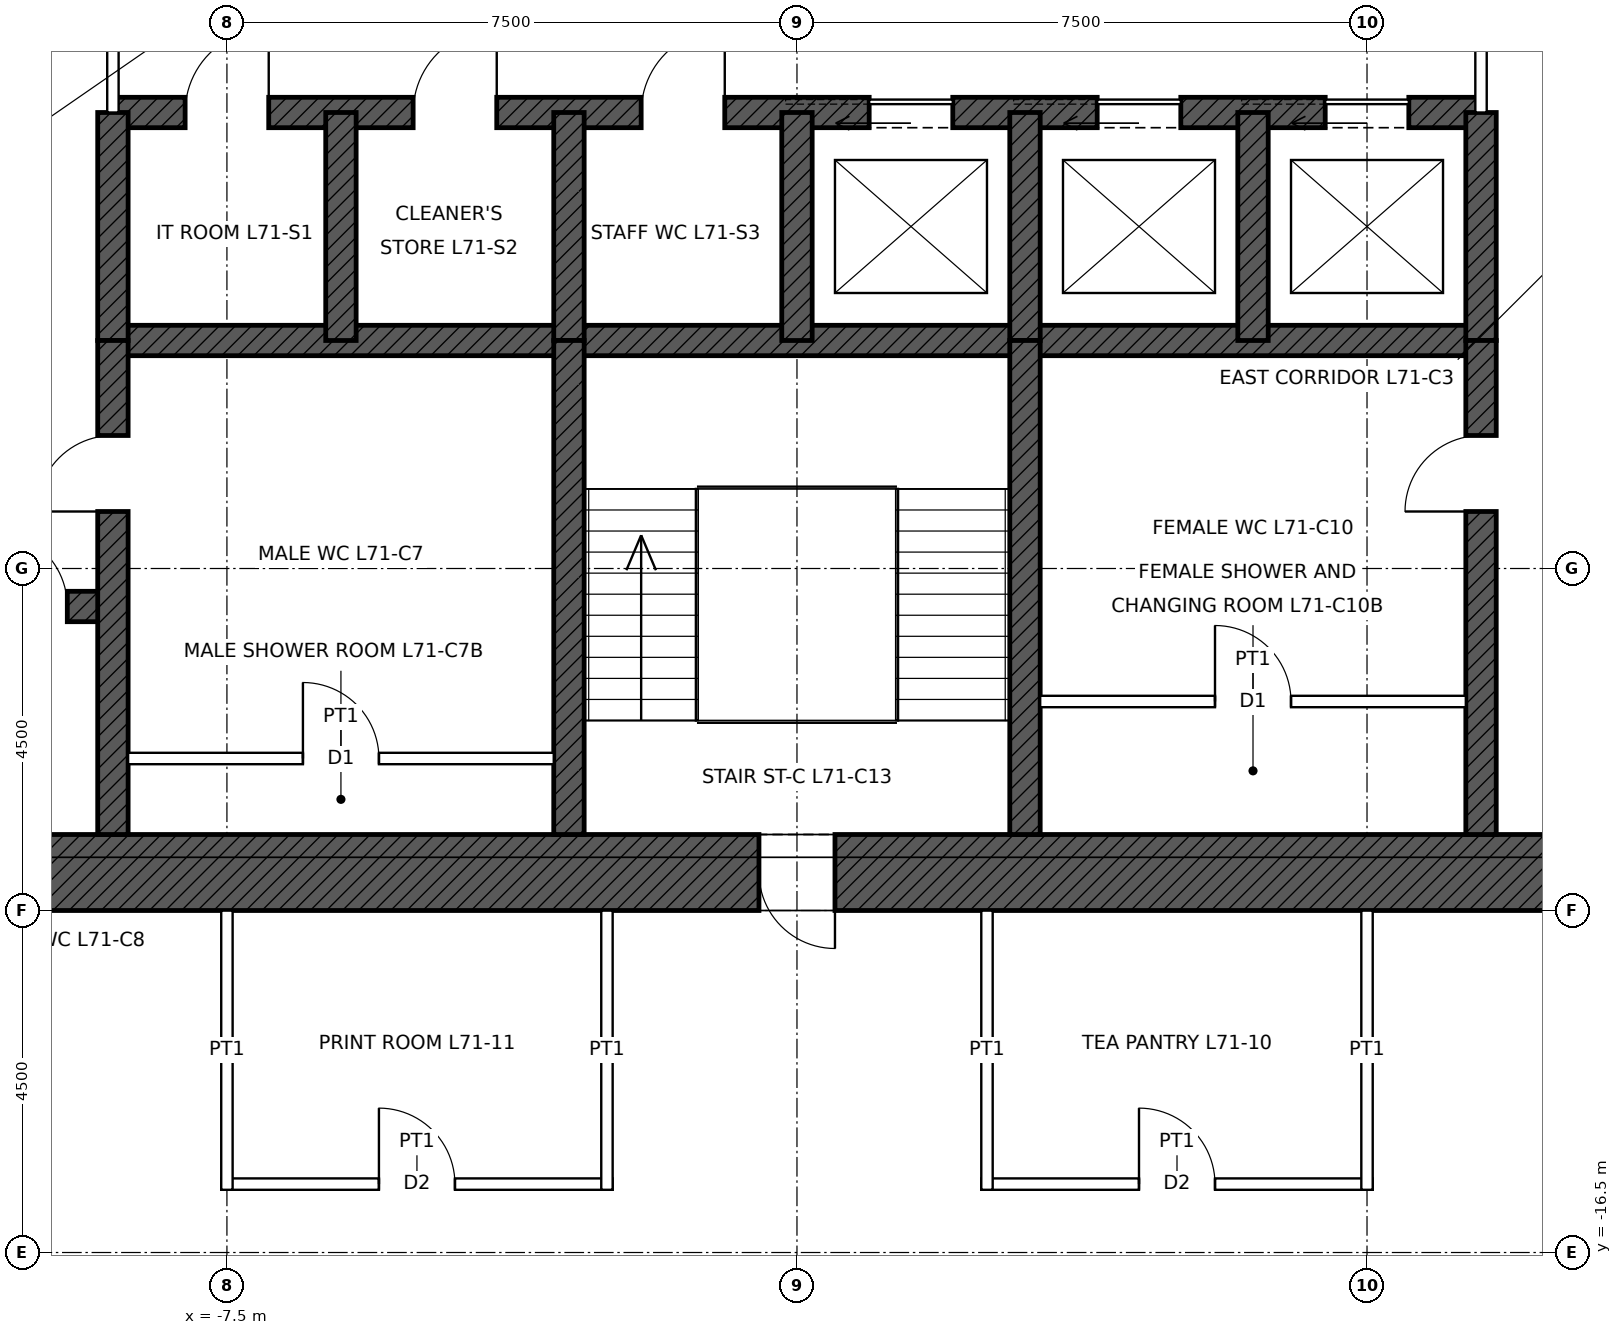
"""IFC4 building model, lengths in metres.
Left out: names, types, materials, properties, quantities, classifications, styles, units other than length and angle.
Written with IfcOpenShell. Run it as: python <this file> out.ifc"""

import sys

from ifc_helpers import new_model, si_unit, direction, frame, frame_2d, origin, place, context, subcontext, project, spatial, rectangle, extrude, element, fill, save


model = new_model("IFC4")
c1 = context("Model", 3, precision=1e-05, world=origin(), true_north=direction((0.0, 1.0)))
c2 = subcontext(c1, "Body", "Model", "MODEL_VIEW")
j1 = project(units=[si_unit("LENGTHUNIT", "METRE"), si_unit("PLANEANGLEUNIT", "RADIAN")], contexts=[c1])
p1 = place(None, origin())
s1 = spatial("IfcSite", under=j1, at=p1, CompositionType="ELEMENT")
p2 = place(p1, origin())
s2 = spatial("IfcBuilding", under=s1, at=p2, CompositionType="ELEMENT")
p3 = place(p2, frame((0.0, 0.0, 319.9)))
s3 = spatial("IfcBuildingStorey", under=s2, at=p3, CompositionType="ELEMENT", Elevation=319.9)
p4 = place(p3, frame((12.0, -11.5, 0.0), z_axis=(0.0, 0.0, 1.0), x_axis=(-1.0, 0.0, 0.0)))
e1 = element("IfcWall", 1, at=p4, inside=s3, PredefinedType="SHEAR", context=c2, shape_type="SweptSolid", body=[
    extrude(rectangle(XDim=24.0, YDim=1.0, at=frame_2d((12.0, 0.0))), origin(), (0.0, 0.0, 1.0), 4.0),
])
p5 = place(p4, frame((11.5, 0.0, 0.0)))
e2 = element("IfcOpeningElement", 2, at=p5, cuts=e1, PredefinedType="OPENING", context=c2, shape_type="SweptSolid", body=[
    extrude(rectangle(XDim=1.0, YDim=2.1, at=frame_2d((0.5, 1.05))), frame((0.0, 0.51, 0.0), z_axis=(0.0, -1.0, 0.0), x_axis=(1.0, 0.0, 0.0)), (0.0, 0.0, 1.0), 1.02),
])
p6 = place(p4, frame((1.0, 0.0, 0.0)))
e3 = element("IfcOpeningElement", 3, at=p6, cuts=e1, PredefinedType="OPENING", context=c2, shape_type="SweptSolid", body=[
    extrude(rectangle(XDim=1.0, YDim=2.4, at=frame_2d((0.5, 1.2))), frame((0.0, 0.51, 0.0), z_axis=(0.0, -1.0, 0.0), x_axis=(1.0, 0.0, 0.0)), (0.0, 0.0, 1.0), 1.02),
])
p7 = place(p3, frame((-9.0, -1.5, 0.0), z_axis=(0.0, 0.0, 1.0), x_axis=(1.0, 0.0, 0.0)))
e4 = element("IfcWall", 4, at=p7, inside=s3, PredefinedType="SHEAR", context=c2, shape_type="SweptSolid", body=[
    extrude(rectangle(XDim=18.0, YDim=0.4, at=frame_2d((9.0, 0.0))), origin(), (0.0, 0.0, 1.0), 4.0),
])
p8 = place(p7, frame((9.95, 0.0, 0.0)))
e5 = element("IfcOpeningElement", 5, at=p8, cuts=e4, PredefinedType="OPENING", context=c2, shape_type="SweptSolid", body=[
    extrude(rectangle(XDim=1.1, YDim=2.1, at=frame_2d((0.55, 1.05))), frame((0.0, 0.21, 0.0), z_axis=(0.0, -1.0, 0.0), x_axis=(1.0, 0.0, 0.0)), (0.0, 0.0, 1.0), 0.42),
])
p9 = place(p7, frame((12.95, 0.0, 0.0)))
e6 = element("IfcOpeningElement", 6, at=p9, cuts=e4, PredefinedType="OPENING", context=c2, shape_type="SweptSolid", body=[
    extrude(rectangle(XDim=1.1, YDim=2.1, at=frame_2d((0.55, 1.05))), frame((0.0, 0.21, 0.0), z_axis=(0.0, -1.0, 0.0), x_axis=(1.0, 0.0, 0.0)), (0.0, 0.0, 1.0), 0.42),
])
p10 = place(p7, frame((15.95, 0.0, 0.0)))
e7 = element("IfcOpeningElement", 7, at=p10, cuts=e4, PredefinedType="OPENING", context=c2, shape_type="SweptSolid", body=[
    extrude(rectangle(XDim=1.1, YDim=2.1, at=frame_2d((0.55, 1.05))), frame((0.0, 0.21, 0.0), z_axis=(0.0, -1.0, 0.0), x_axis=(1.0, 0.0, 0.0)), (0.0, 0.0, 1.0), 0.42),
])
p11 = place(p7, frame((0.95, 0.0, 0.0)))
e8 = element("IfcOpeningElement", 8, at=p11, cuts=e4, PredefinedType="OPENING", context=c2, shape_type="SweptSolid", body=[
    extrude(rectangle(XDim=1.1, YDim=2.1, at=frame_2d((0.55, 1.05))), frame((0.0, 0.21, 0.0), z_axis=(0.0, -1.0, 0.0), x_axis=(1.0, 0.0, 0.0)), (0.0, 0.0, 1.0), 0.42),
])
p12 = place(p7, frame((3.95, 0.0, 0.0)))
e9 = element("IfcOpeningElement", 9, at=p12, cuts=e4, PredefinedType="OPENING", context=c2, shape_type="SweptSolid", body=[
    extrude(rectangle(XDim=1.1, YDim=2.1, at=frame_2d((0.55, 1.05))), frame((0.0, 0.21, 0.0), z_axis=(0.0, -1.0, 0.0), x_axis=(1.0, 0.0, 0.0)), (0.0, 0.0, 1.0), 0.42),
])
p13 = place(p7, frame((6.95, 0.0, 0.0)))
e10 = element("IfcOpeningElement", 10, at=p13, cuts=e4, PredefinedType="OPENING", context=c2, shape_type="SweptSolid", body=[
    extrude(rectangle(XDim=1.1, YDim=2.1, at=frame_2d((0.55, 1.05))), frame((0.0, 0.21, 0.0), z_axis=(0.0, -1.0, 0.0), x_axis=(1.0, 0.0, 0.0)), (0.0, 0.0, 1.0), 0.42),
])
p14 = place(p3, frame((-9.0, -4.5, 0.0), z_axis=(0.0, 0.0, 1.0), x_axis=(1.0, 0.0, 0.0)))
e11 = element("IfcWall", 11, at=p14, inside=s3, PredefinedType="SHEAR", context=c2, shape_type="SweptSolid", body=[
    extrude(rectangle(XDim=18.0, YDim=0.4, at=frame_2d((9.0, 0.0))), origin(), (0.0, 0.0, 1.0), 4.0),
])
p15 = place(p3, frame((-11.0, -8.0, 0.0), z_axis=(0.0, 0.0, 1.0), x_axis=(1.0, 0.0, 0.0)))
e12 = element("IfcWall", 12, at=p15, inside=s3, PredefinedType="SHEAR", context=c2, shape_type="SweptSolid", body=[
    extrude(rectangle(XDim=2.0, YDim=0.4, at=frame_2d((1.0, 0.0))), origin(), (0.0, 0.0, 1.0), 4.0),
])
p16 = place(p15, frame((0.4, 0.0, 0.0)))
e13 = element("IfcOpeningElement", 13, at=p16, cuts=e12, PredefinedType="OPENING", context=c2, shape_type="SweptSolid", body=[
    extrude(rectangle(XDim=1.0, YDim=2.1, at=frame_2d((0.5, 1.05))), frame((0.0, 0.21, 0.0), z_axis=(0.0, -1.0, 0.0), x_axis=(1.0, 0.0, 0.0)), (0.0, 0.0, 1.0), 0.42),
])
for number, where, z_axis, x_axis in (
    (14, (-9.0, -4.5, 0.0), (0.0, 0.0, 1.0), (0.0, 1.0, 0.0)),
    (15, (9.0, -4.5, 0.0), (0.0, 0.0, 1.0), (0.0, 1.0, 0.0)),
    (16, (-6.0, -4.5, 0.0), (0.0, 0.0, 1.0), (0.0, 1.0, 0.0)),
    (17, (-3.0, -4.5, 0.0), (0.0, 0.0, 1.0), (0.0, 1.0, 0.0)),
    (18, (0.0, -4.5, 0.0), (0.0, 0.0, 1.0), (0.0, 1.0, 0.0)),
    (19, (3.0, -4.5, 0.0), (0.0, 0.0, 1.0), (0.0, 1.0, 0.0)),
    (20, (6.0, -4.5, 0.0), (0.0, 0.0, 1.0), (0.0, 1.0, 0.0)),
):
    element("IfcWall", number, at=place(p3, frame(where, z_axis=z_axis, x_axis=x_axis)), inside=s3, PredefinedType="SHEAR", context=c2, shape_type="SweptSolid", body=[
        extrude(rectangle(XDim=3.0, YDim=0.4, at=frame_2d((1.5, 0.0))), origin(), (0.0, 0.0, 1.0), 4.0),
    ])
p17 = place(p3, frame((-9.0, -11.0, 0.0), z_axis=(0.0, 0.0, 1.0), x_axis=(0.0, 1.0, 0.0)))
e21 = element("IfcWall", 21, at=p17, inside=s3, PredefinedType="SHEAR", context=c2, shape_type="SweptSolid", body=[
    extrude(rectangle(XDim=6.5, YDim=0.4, at=frame_2d((3.25, 0.0))), origin(), (0.0, 0.0, 1.0), 4.0),
])
p18 = place(p17, frame((4.25, 0.0, 0.0)))
e22 = element("IfcOpeningElement", 22, at=p18, cuts=e21, PredefinedType="OPENING", context=c2, shape_type="SweptSolid", body=[
    extrude(rectangle(XDim=1.0, YDim=2.1, at=frame_2d((0.5, 1.05))), frame((0.0, 0.21, 0.0), z_axis=(0.0, -1.0, 0.0), x_axis=(1.0, 0.0, 0.0)), (0.0, 0.0, 1.0), 0.42),
])
p19 = place(p3, frame((9.0, -11.0, 0.0), z_axis=(0.0, 0.0, 1.0), x_axis=(0.0, 1.0, 0.0)))
e23 = element("IfcWall", 23, at=p19, inside=s3, PredefinedType="SHEAR", context=c2, shape_type="SweptSolid", body=[
    extrude(rectangle(XDim=6.5, YDim=0.4, at=frame_2d((3.25, 0.0))), origin(), (0.0, 0.0, 1.0), 4.0),
])
p20 = place(p19, frame((4.25, 0.0, 0.0)))
e24 = element("IfcOpeningElement", 24, at=p20, cuts=e23, PredefinedType="OPENING", context=c2, shape_type="SweptSolid", body=[
    extrude(rectangle(XDim=1.0, YDim=2.1, at=frame_2d((0.5, 1.05))), frame((0.0, 0.21, 0.0), z_axis=(0.0, -1.0, 0.0), x_axis=(1.0, 0.0, 0.0)), (0.0, 0.0, 1.0), 0.42),
])
for number, where, z_axis, x_axis in (
    (25, (-3.0, -11.0, 0.0), (0.0, 0.0, 1.0), (0.0, 1.0, 0.0)),
    (26, (3.0, -11.0, 0.0), (0.0, 0.0, 1.0), (0.0, 1.0, 0.0)),
):
    element("IfcWall", number, at=place(p3, frame(where, z_axis=z_axis, x_axis=x_axis)), inside=s3, PredefinedType="SHEAR", context=c2, shape_type="SweptSolid", body=[
        extrude(rectangle(XDim=6.5, YDim=0.4, at=frame_2d((3.25, 0.0))), origin(), (0.0, 0.0, 1.0), 4.0),
    ])
p21 = place(p3, frame((-7.575, -15.6, 0.0), z_axis=(0.0, 0.0, 1.0), x_axis=(1.0, 0.0, 0.0)))
e27 = element("IfcWall", 27, at=p21, inside=s3, PredefinedType="PARTITIONING", context=c2, shape_type="SweptSolid", body=[
    extrude(rectangle(XDim=5.15, YDim=0.15, at=frame_2d((2.575, 0.0))), origin(), (0.0, 0.0, 1.0), 3.85),
])
p22 = place(p21, frame((2.075, 0.0, 0.0)))
e28 = element("IfcOpeningElement", 28, at=p22, cuts=e27, PredefinedType="OPENING", context=c2, shape_type="SweptSolid", body=[
    extrude(rectangle(XDim=1.0, YDim=2.1, at=frame_2d((0.5, 1.05))), frame((0.0, 0.085, 0.0), z_axis=(0.0, -1.0, 0.0), x_axis=(1.0, 0.0, 0.0)), (0.0, 0.0, 1.0), 0.17),
])
p23 = place(p3, frame((2.425, -15.6, 0.0), z_axis=(0.0, 0.0, 1.0), x_axis=(1.0, 0.0, 0.0)))
e29 = element("IfcWall", 29, at=p23, inside=s3, PredefinedType="PARTITIONING", context=c2, shape_type="SweptSolid", body=[
    extrude(rectangle(XDim=5.15, YDim=0.15, at=frame_2d((2.575, 0.0))), origin(), (0.0, 0.0, 1.0), 3.85),
])
p24 = place(p23, frame((2.075, 0.0, 0.0)))
e30 = element("IfcOpeningElement", 30, at=p24, cuts=e29, PredefinedType="OPENING", context=c2, shape_type="SweptSolid", body=[
    extrude(rectangle(XDim=1.0, YDim=2.1, at=frame_2d((0.5, 1.05))), frame((0.0, 0.085, 0.0), z_axis=(0.0, -1.0, 0.0), x_axis=(1.0, 0.0, 0.0)), (0.0, 0.0, 1.0), 0.17),
])
p25 = place(p3, frame((-7.5, -15.675, 0.0), z_axis=(0.0, 0.0, 1.0), x_axis=(0.0, 1.0, 0.0)))
e31 = element("IfcWall", 31, at=p25, inside=s3, PredefinedType="PARTITIONING", context=c2, shape_type="SweptSolid", body=[
    extrude(rectangle(XDim=3.675, YDim=0.15, at=frame_2d((1.837, 0.0))), origin(), (0.0, 0.0, 1.0), 3.243),
])
for number, where, z_axis, x_axis in (
    (32, (-2.5, -15.675, 0.0), (0.0, 0.0, 1.0), (0.0, 1.0, 0.0)),
    (33, (2.5, -15.675, 0.0), (0.0, 0.0, 1.0), (0.0, 1.0, 0.0)),
):
    element("IfcWall", number, at=place(p3, frame(where, z_axis=z_axis, x_axis=x_axis)), inside=s3, PredefinedType="PARTITIONING", context=c2, shape_type="SweptSolid", body=[
        extrude(rectangle(XDim=3.675, YDim=0.15, at=frame_2d((1.837, 0.0))), origin(), (0.0, 0.0, 1.0), 3.85),
    ])
p26 = place(p3, frame((7.5, -15.675, 0.0), z_axis=(0.0, 0.0, 1.0), x_axis=(0.0, 1.0, 0.0)))
e34 = element("IfcWall", 34, at=p26, inside=s3, PredefinedType="PARTITIONING", context=c2, shape_type="SweptSolid", body=[
    extrude(rectangle(XDim=3.675, YDim=0.15, at=frame_2d((1.837, 0.0))), origin(), (0.0, 0.0, 1.0), 3.243),
])
p27 = place(p3, frame((-8.8, -10.0, 0.0), z_axis=(0.0, 0.0, 1.0), x_axis=(1.0, 0.0, 0.0)))
e35 = element("IfcWall", 35, at=p27, inside=s3, PredefinedType="PARTITIONING", context=c2, shape_type="SweptSolid", body=[
    extrude(rectangle(XDim=5.6, YDim=0.15, at=frame_2d((2.8, 0.0))), origin(), (0.0, 0.0, 1.0), 3.75),
])
p28 = place(p27, frame((2.3, 0.0, 0.0)))
e36 = element("IfcOpeningElement", 36, at=p28, cuts=e35, PredefinedType="OPENING", context=c2, shape_type="SweptSolid", body=[
    extrude(rectangle(XDim=1.0, YDim=2.1, at=frame_2d((0.5, 1.05))), frame((0.0, 0.085, 0.0), z_axis=(0.0, -1.0, 0.0), x_axis=(1.0, 0.0, 0.0)), (0.0, 0.0, 1.0), 0.17),
])
p29 = place(p3, frame((3.2, -9.25, 0.0), z_axis=(0.0, 0.0, 1.0), x_axis=(1.0, 0.0, 0.0)))
e37 = element("IfcWall", 37, at=p29, inside=s3, PredefinedType="PARTITIONING", context=c2, shape_type="SweptSolid", body=[
    extrude(rectangle(XDim=5.6, YDim=0.15, at=frame_2d((2.8, 0.0))), origin(), (0.0, 0.0, 1.0), 3.75),
])
p30 = place(p29, frame((2.3, 0.0, 0.0)))
e38 = element("IfcOpeningElement", 38, at=p30, cuts=e37, PredefinedType="OPENING", context=c2, shape_type="SweptSolid", body=[
    extrude(rectangle(XDim=1.0, YDim=2.1, at=frame_2d((0.5, 1.05))), frame((0.0, 0.085, 0.0), z_axis=(0.0, -1.0, 0.0), x_axis=(1.0, 0.0, 0.0)), (0.0, 0.0, 1.0), 0.17),
])
p31 = place(p3, frame((-9.0, -1.5, 0.0), z_axis=(0.0, 0.0, 1.0), x_axis=(0.0, 1.0, 0.0)))
e39 = element("IfcWall", 39, at=p31, inside=s3, PredefinedType="PARTITIONING", context=c2, shape_type="SweptSolid", body=[
    extrude(rectangle(XDim=3.0, YDim=0.15, at=frame_2d((1.5, 0.0))), origin(), (0.0, 0.0, 1.0), 3.75),
])
p32 = place(p31, frame((1.0, 0.0, 0.0)))
e40 = element("IfcOpeningElement", 40, at=p32, cuts=e39, PredefinedType="OPENING", context=c2, shape_type="SweptSolid", body=[
    extrude(rectangle(XDim=1.0, YDim=2.4, at=frame_2d((0.5, 1.2))), frame((0.0, 0.085, 0.0), z_axis=(0.0, -1.0, 0.0), x_axis=(1.0, 0.0, 0.0)), (0.0, 0.0, 1.0), 0.17),
])
p33 = place(p3, frame((9.0, -1.5, 0.0), z_axis=(0.0, 0.0, 1.0), x_axis=(0.0, 1.0, 0.0)))
e41 = element("IfcWall", 41, at=p33, inside=s3, PredefinedType="PARTITIONING", context=c2, shape_type="SweptSolid", body=[
    extrude(rectangle(XDim=3.0, YDim=0.15, at=frame_2d((1.5, 0.0))), origin(), (0.0, 0.0, 1.0), 3.75),
])
p34 = place(p33, frame((1.0, 0.0, 0.0)))
e42 = element("IfcOpeningElement", 42, at=p34, cuts=e41, PredefinedType="OPENING", context=c2, shape_type="SweptSolid", body=[
    extrude(rectangle(XDim=1.0, YDim=2.4, at=frame_2d((0.5, 1.2))), frame((0.0, 0.085, 0.0), z_axis=(0.0, -1.0, 0.0), x_axis=(1.0, 0.0, 0.0)), (0.0, 0.0, 1.0), 0.17),
])
p35 = place(p5, origin())
e43 = element("IfcDoor", 43, at=p35, inside=s3, OperationType="SINGLE_SWING_LEFT", PredefinedType="DOOR", context=c2, shape_type="SweptSolid", body=[
    extrude(rectangle(XDim=1.0, YDim=2.1, at=frame_2d((0.5, 1.05))), frame((0.0, 0.485, 0.0), z_axis=(0.0, -1.0, 0.0), x_axis=(1.0, 0.0, 0.0)), (0.0, 0.0, 1.0), 0.05),
])
fill(e2, e43)
p36 = place(p18, origin())
e44 = element("IfcDoor", 44, at=p36, inside=s3, OperationType="SINGLE_SWING_LEFT", PredefinedType="DOOR", context=c2, shape_type="SweptSolid", body=[
    extrude(rectangle(XDim=1.0, YDim=2.1, at=frame_2d((0.5, 1.05))), frame((0.0, 0.025, 0.0), z_axis=(0.0, -1.0, 0.0), x_axis=(1.0, 0.0, 0.0)), (0.0, 0.0, 1.0), 0.05),
])
fill(e22, e44)
p37 = place(p20, origin())
e45 = element("IfcDoor", 45, at=p37, inside=s3, OperationType="SINGLE_SWING_LEFT", PredefinedType="DOOR", context=c2, shape_type="SweptSolid", body=[
    extrude(rectangle(XDim=1.0, YDim=2.1, at=frame_2d((0.5, 1.05))), frame((0.0, 0.025, 0.0), z_axis=(0.0, -1.0, 0.0), x_axis=(1.0, 0.0, 0.0)), (0.0, 0.0, 1.0), 0.05),
])
fill(e24, e45)
p38 = place(p16, origin())
e46 = element("IfcDoor", 46, at=p38, inside=s3, OperationType="SINGLE_SWING_LEFT", PredefinedType="DOOR", context=c2, shape_type="SweptSolid", body=[
    extrude(rectangle(XDim=1.0, YDim=2.1, at=frame_2d((0.5, 1.05))), frame((0.0, 0.025, 0.0), z_axis=(0.0, -1.0, 0.0), x_axis=(1.0, 0.0, 0.0)), (0.0, 0.0, 1.0), 0.05),
])
fill(e13, e46)
p39 = place(p8, origin())
e47 = element("IfcDoor", 47, at=p39, inside=s3, OperationType="SLIDING_TO_LEFT", PredefinedType="DOOR", context=c2, shape_type="SweptSolid", body=[
    extrude(rectangle(XDim=1.1, YDim=2.1, at=frame_2d((0.55, 1.05))), frame((0.0, 0.025, 0.0), z_axis=(0.0, -1.0, 0.0), x_axis=(1.0, 0.0, 0.0)), (0.0, 0.0, 1.0), 0.05),
])
fill(e5, e47)
p40 = place(p9, origin())
e48 = element("IfcDoor", 48, at=p40, inside=s3, OperationType="SLIDING_TO_LEFT", PredefinedType="DOOR", context=c2, shape_type="SweptSolid", body=[
    extrude(rectangle(XDim=1.1, YDim=2.1, at=frame_2d((0.55, 1.05))), frame((0.0, 0.025, 0.0), z_axis=(0.0, -1.0, 0.0), x_axis=(1.0, 0.0, 0.0)), (0.0, 0.0, 1.0), 0.05),
])
fill(e6, e48)
p41 = place(p10, origin())
e49 = element("IfcDoor", 49, at=p41, inside=s3, OperationType="SLIDING_TO_LEFT", PredefinedType="DOOR", context=c2, shape_type="SweptSolid", body=[
    extrude(rectangle(XDim=1.1, YDim=2.1, at=frame_2d((0.55, 1.05))), frame((0.0, 0.025, 0.0), z_axis=(0.0, -1.0, 0.0), x_axis=(1.0, 0.0, 0.0)), (0.0, 0.0, 1.0), 0.05),
])
fill(e7, e49)
p42 = place(p28, origin())
e50 = element("IfcDoor", 50, at=p42, inside=s3, OperationType="SINGLE_SWING_LEFT", PredefinedType="DOOR", context=c2, shape_type="SweptSolid", body=[
    extrude(rectangle(XDim=1.0, YDim=2.1, at=frame_2d((0.5, 1.05))), frame((0.0, 0.025, 0.0), z_axis=(0.0, -1.0, 0.0), x_axis=(1.0, 0.0, 0.0)), (0.0, 0.0, 1.0), 0.05),
])
fill(e36, e50)
p43 = place(p30, origin())
e51 = element("IfcDoor", 51, at=p43, inside=s3, OperationType="SINGLE_SWING_LEFT", PredefinedType="DOOR", context=c2, shape_type="SweptSolid", body=[
    extrude(rectangle(XDim=1.0, YDim=2.1, at=frame_2d((0.5, 1.05))), frame((0.0, 0.025, 0.0), z_axis=(0.0, -1.0, 0.0), x_axis=(1.0, 0.0, 0.0)), (0.0, 0.0, 1.0), 0.05),
])
fill(e38, e51)
p44 = place(p11, origin())
e52 = element("IfcDoor", 52, at=p44, inside=s3, OperationType="SINGLE_SWING_RIGHT", PredefinedType="DOOR", context=c2, shape_type="SweptSolid", body=[
    extrude(rectangle(XDim=1.1, YDim=2.1, at=frame_2d((0.55, 1.05))), frame((0.0, 0.025, 0.0), z_axis=(0.0, -1.0, 0.0), x_axis=(1.0, 0.0, 0.0)), (0.0, 0.0, 1.0), 0.05),
])
fill(e8, e52)
p45 = place(p12, origin())
e53 = element("IfcDoor", 53, at=p45, inside=s3, OperationType="SINGLE_SWING_RIGHT", PredefinedType="DOOR", context=c2, shape_type="SweptSolid", body=[
    extrude(rectangle(XDim=1.1, YDim=2.1, at=frame_2d((0.55, 1.05))), frame((0.0, 0.025, 0.0), z_axis=(0.0, -1.0, 0.0), x_axis=(1.0, 0.0, 0.0)), (0.0, 0.0, 1.0), 0.05),
])
fill(e9, e53)
p46 = place(p13, origin())
e54 = element("IfcDoor", 54, at=p46, inside=s3, OperationType="SINGLE_SWING_RIGHT", PredefinedType="DOOR", context=c2, shape_type="SweptSolid", body=[
    extrude(rectangle(XDim=1.1, YDim=2.1, at=frame_2d((0.55, 1.05))), frame((0.0, 0.025, 0.0), z_axis=(0.0, -1.0, 0.0), x_axis=(1.0, 0.0, 0.0)), (0.0, 0.0, 1.0), 0.05),
])
fill(e10, e54)
p47 = place(p24, origin())
e55 = element("IfcDoor", 55, at=p47, inside=s3, OperationType="SINGLE_SWING_LEFT", PredefinedType="DOOR", context=c2, shape_type="SweptSolid", body=[
    extrude(rectangle(XDim=1.0, YDim=2.1, at=frame_2d((0.5, 1.05))), frame((0.0, 0.025, 0.0), z_axis=(0.0, -1.0, 0.0), x_axis=(1.0, 0.0, 0.0)), (0.0, 0.0, 1.0), 0.05),
])
fill(e30, e55)
p48 = place(p22, origin())
e56 = element("IfcDoor", 56, at=p48, inside=s3, OperationType="SINGLE_SWING_LEFT", PredefinedType="DOOR", context=c2, shape_type="SweptSolid", body=[
    extrude(rectangle(XDim=1.0, YDim=2.1, at=frame_2d((0.5, 1.05))), frame((0.0, 0.025, 0.0), z_axis=(0.0, -1.0, 0.0), x_axis=(1.0, 0.0, 0.0)), (0.0, 0.0, 1.0), 0.05),
])
fill(e28, e56)
save(model, sys.argv[1])
